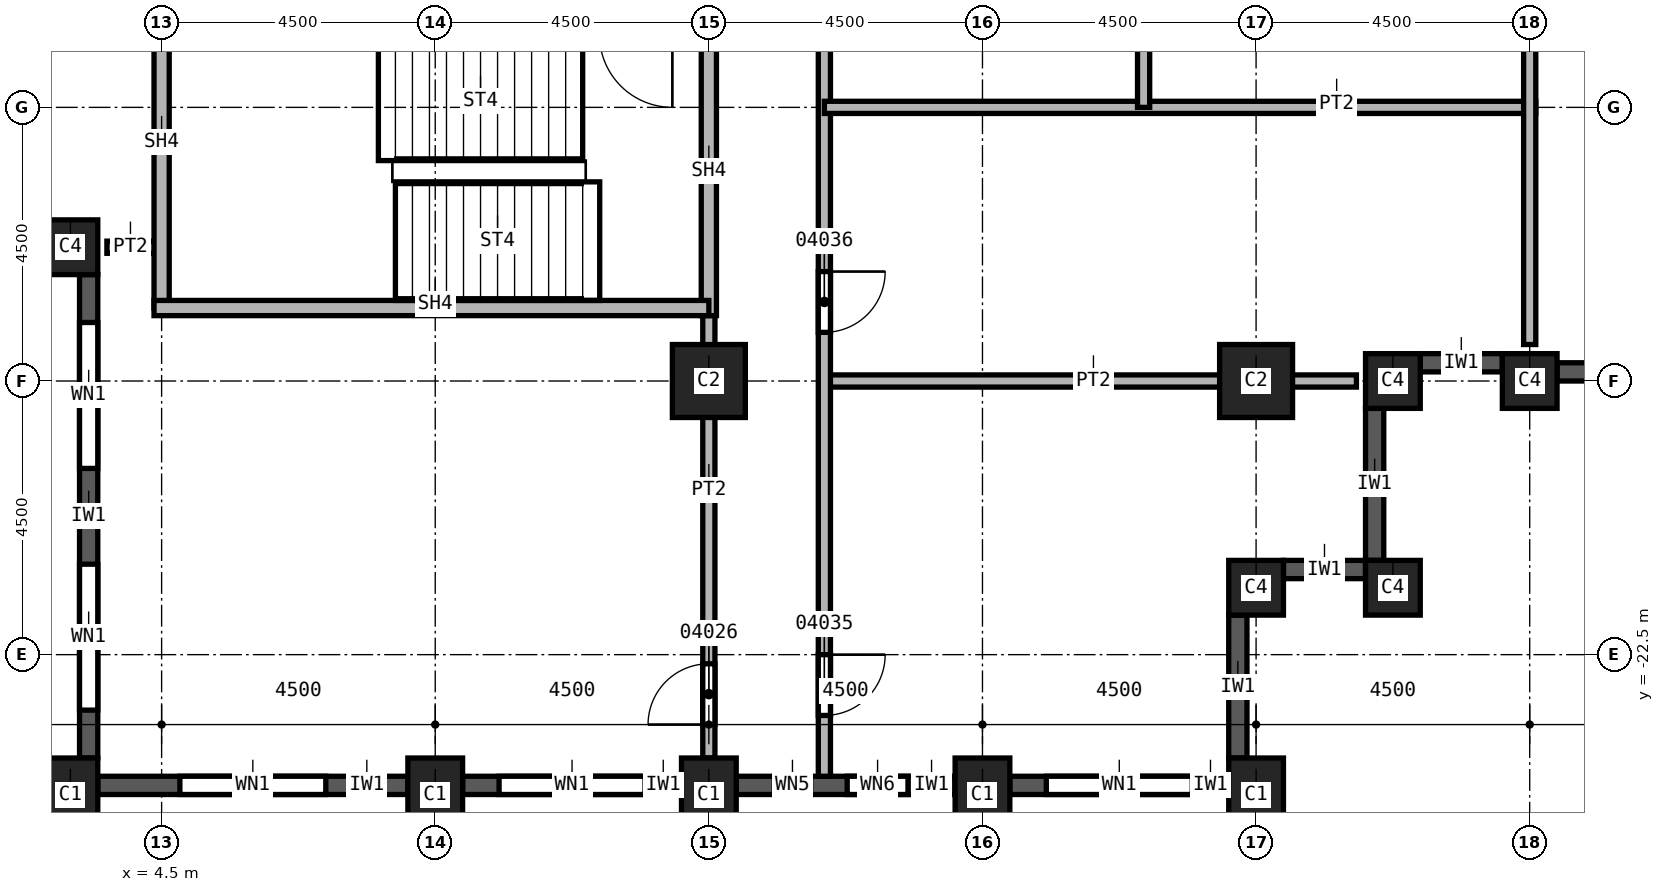
"""IFC4 building model, lengths in metres.
Left out: names, types, materials, properties, quantities, classifications, styles, units other than length and angle.
Written with IfcOpenShell. Run it as: python <this file> out.ifc"""

import sys

from ifc_helpers import new_model, si_unit, direction, frame, frame_2d, origin, origin_2d, place, context, subcontext, project, spatial, rectangle, extrude, element, fill, save


model = new_model("IFC4")
c1 = context("Model", 3, precision=1e-05, world=origin(), true_north=direction((0.0, 1.0)))
c2 = subcontext(c1, "Body", "Model", "MODEL_VIEW")
j1 = project(units=[si_unit("LENGTHUNIT", "METRE"), si_unit("PLANEANGLEUNIT", "RADIAN")], contexts=[c1])
p1 = place(None, origin())
s1 = spatial("IfcSite", under=j1, at=p1, CompositionType="ELEMENT")
p2 = place(p1, origin())
s2 = spatial("IfcBuilding", under=s1, at=p2, CompositionType="ELEMENT")
p3 = place(p2, frame((0.0, 0.0, 104.0)))
s3 = spatial("IfcBuildingStorey", under=s2, at=p3, CompositionType="ELEMENT", Elevation=104.0)
for number, where, z_axis, x_axis in (
    (1, (13.5, -18.0, 0.0), (0.0, 0.0, 1.0), (1.0, 0.0, 0.0)),
    (2, (22.5, -18.0, 0.0), (0.0, 0.0, 1.0), (1.0, 0.0, 0.0)),
):
    element("IfcColumn", number, at=place(p3, frame(where, z_axis=z_axis, x_axis=x_axis)), inside=s3, PredefinedType="COLUMN", context=c2, shape_type="SweptSolid", body=[
        extrude(rectangle(XDim=1.2, YDim=1.2, at=origin_2d()), origin(), (0.0, 0.0, 1.0), 3.7),
    ])
p4 = place(p3, frame((27.0, -18.0, 0.0), z_axis=(0.0, 0.0, 1.0), x_axis=(1.0, 0.0, 0.0)))
e3 = element("IfcColumn", 3, at=p4, inside=s3, PredefinedType="COLUMN", context=c2, shape_type="SweptSolid", body=[
    extrude(rectangle(XDim=0.9, YDim=0.9, at=origin_2d()), origin(), (0.0, 0.0, 1.0), 3.7),
])
for number, where, z_axis, x_axis in (
    (4, (3.0, -24.8, 0.0), (0.0, 0.0, 1.0), (1.0, 0.0, 0.0)),
    (5, (9.0, -24.8, 0.0), (0.0, 0.0, 1.0), (1.0, 0.0, 0.0)),
    (6, (13.5, -24.8, 0.0), (0.0, 0.0, 1.0), (1.0, 0.0, 0.0)),
    (7, (18.0, -24.8, 0.0), (0.0, 0.0, 1.0), (1.0, 0.0, 0.0)),
    (8, (22.5, -24.8, 0.0), (0.0, 0.0, 1.0), (1.0, 0.0, 0.0)),
):
    element("IfcColumn", number, at=place(p3, frame(where, z_axis=z_axis, x_axis=x_axis)), inside=s3, PredefinedType="COLUMN", context=c2, shape_type="SweptSolid", body=[
        extrude(rectangle(XDim=0.9, YDim=1.2, at=origin_2d()), origin(), (0.0, 0.0, 1.0), 3.7),
    ])
for number, where, z_axis, x_axis in (
    (9, (3.0, -15.8, 0.0), (0.0, 0.0, 1.0), (1.0, 0.0, 0.0)),
    (10, (22.5, -21.4, 0.0), (0.0, 0.0, 1.0), (1.0, 0.0, 0.0)),
    (11, (24.75, -21.4, 0.0), (0.0, 0.0, 1.0), (1.0, 0.0, 0.0)),
    (12, (24.75, -18.0, 0.0), (0.0, 0.0, 1.0), (1.0, 0.0, 0.0)),
):
    element("IfcColumn", number, at=place(p3, frame(where, z_axis=z_axis, x_axis=x_axis)), inside=s3, PredefinedType="COLUMN", context=c2, shape_type="SweptSolid", body=[
        extrude(rectangle(XDim=0.9, YDim=0.9, at=origin_2d()), origin(), (0.0, 0.0, 1.0), 3.7),
    ])
p5 = place(p3, frame((3.3, -16.25, 0.0), z_axis=(0.0, 0.0, 1.0), x_axis=(0.0, -1.0, 0.0)))
e13 = element("IfcWall", 13, at=p5, inside=s3, PredefinedType="SOLIDWALL", context=c2, shape_type="SweptSolid", body=[
    extrude(rectangle(XDim=7.95, YDim=0.3, at=frame_2d((3.975, 0.0))), origin(), (0.0, 0.0, 1.0), 3.1),
])
p6 = place(p5, frame((0.788, 0.0, 0.8)))
e14 = element("IfcOpeningElement", 14, at=p6, cuts=e13, PredefinedType="OPENING", context=c2, shape_type="SweptSolid", body=[
    extrude(rectangle(XDim=2.4, YDim=1.95, at=frame_2d((1.2, 0.975))), frame((0.0, 0.15, 0.0), z_axis=(0.0, -1.0, 0.0), x_axis=(1.0, 0.0, 0.0)), (0.0, 0.0, 1.0), 0.3),
])
p7 = place(p5, frame((4.762, 0.0, 0.8)))
e15 = element("IfcOpeningElement", 15, at=p7, cuts=e13, PredefinedType="OPENING", context=c2, shape_type="SweptSolid", body=[
    extrude(rectangle(XDim=2.4, YDim=1.95, at=frame_2d((1.2, 0.975))), frame((0.0, 0.15, 0.0), z_axis=(0.0, -1.0, 0.0), x_axis=(1.0, 0.0, 0.0)), (0.0, 0.0, 1.0), 0.3),
])
p8 = place(p3, frame((3.45, -24.65, 0.0), z_axis=(0.0, 0.0, 1.0), x_axis=(1.0, 0.0, 0.0)))
e16 = element("IfcWall", 16, at=p8, inside=s3, PredefinedType="SOLIDWALL", context=c2, shape_type="SweptSolid", body=[
    extrude(rectangle(XDim=5.1, YDim=0.3, at=frame_2d((2.55, 0.0))), origin(), (0.0, 0.0, 1.0), 3.1),
])
p9 = place(p8, frame((1.35, 0.0, 0.8)))
e17 = element("IfcOpeningElement", 17, at=p9, cuts=e16, PredefinedType="OPENING", context=c2, shape_type="SweptSolid", body=[
    extrude(rectangle(XDim=2.4, YDim=1.95, at=frame_2d((1.2, 0.975))), frame((0.0, 0.15, 0.0), z_axis=(0.0, -1.0, 0.0), x_axis=(1.0, 0.0, 0.0)), (0.0, 0.0, 1.0), 0.3),
])
p10 = place(p3, frame((9.45, -24.65, 0.0), z_axis=(0.0, 0.0, 1.0), x_axis=(1.0, 0.0, 0.0)))
e18 = element("IfcWall", 18, at=p10, inside=s3, PredefinedType="SOLIDWALL", context=c2, shape_type="SweptSolid", body=[
    extrude(rectangle(XDim=3.6, YDim=0.3, at=frame_2d((1.8, 0.0))), origin(), (0.0, 0.0, 1.0), 3.1),
])
p11 = place(p10, frame((0.6, 0.0, 0.8)))
e19 = element("IfcOpeningElement", 19, at=p11, cuts=e18, PredefinedType="OPENING", context=c2, shape_type="SweptSolid", body=[
    extrude(rectangle(XDim=2.4, YDim=1.95, at=frame_2d((1.2, 0.975))), frame((0.0, 0.15, 0.0), z_axis=(0.0, -1.0, 0.0), x_axis=(1.0, 0.0, 0.0)), (0.0, 0.0, 1.0), 0.3),
])
p12 = place(p3, frame((13.95, -24.65, 0.0), z_axis=(0.0, 0.0, 1.0), x_axis=(1.0, 0.0, 0.0)))
e20 = element("IfcWall", 20, at=p12, inside=s3, PredefinedType="SOLIDWALL", context=c2, shape_type="SweptSolid", body=[
    extrude(rectangle(XDim=3.6, YDim=0.3, at=frame_2d((1.8, 0.0))), origin(), (0.0, 0.0, 1.0), 3.1),
])
p13 = place(p12, frame((0.625, 0.0, 0.8)))
e21 = element("IfcOpeningElement", 21, at=p13, cuts=e20, PredefinedType="OPENING", context=c2, shape_type="SweptSolid", body=[
    extrude(rectangle(XDim=0.6, YDim=1.95, at=frame_2d((0.3, 0.975))), frame((0.0, 0.15, 0.0), z_axis=(0.0, -1.0, 0.0), x_axis=(1.0, 0.0, 0.0)), (0.0, 0.0, 1.0), 0.3),
])
p14 = place(p12, frame((1.825, 0.0, 0.8)))
e22 = element("IfcOpeningElement", 22, at=p14, cuts=e20, PredefinedType="OPENING", context=c2, shape_type="SweptSolid", body=[
    extrude(rectangle(XDim=1.0, YDim=1.95, at=frame_2d((0.5, 0.975))), frame((0.0, 0.15, 0.0), z_axis=(0.0, -1.0, 0.0), x_axis=(1.0, 0.0, 0.0)), (0.0, 0.0, 1.0), 0.3),
])
p15 = place(p3, frame((18.45, -24.65, 0.0), z_axis=(0.0, 0.0, 1.0), x_axis=(1.0, 0.0, 0.0)))
e23 = element("IfcWall", 23, at=p15, inside=s3, PredefinedType="SOLIDWALL", context=c2, shape_type="SweptSolid", body=[
    extrude(rectangle(XDim=3.6, YDim=0.3, at=frame_2d((1.8, 0.0))), origin(), (0.0, 0.0, 1.0), 3.1),
])
p16 = place(p15, frame((0.6, 0.0, 0.8)))
e24 = element("IfcOpeningElement", 24, at=p16, cuts=e23, PredefinedType="OPENING", context=c2, shape_type="SweptSolid", body=[
    extrude(rectangle(XDim=2.4, YDim=1.95, at=frame_2d((1.2, 0.975))), frame((0.0, 0.15, 0.0), z_axis=(0.0, -1.0, 0.0), x_axis=(1.0, 0.0, 0.0)), (0.0, 0.0, 1.0), 0.3),
])
p17 = place(p3, frame((22.2, -24.2, 0.0), z_axis=(0.0, 0.0, 1.0), x_axis=(0.0, 1.0, 0.0)))
e25 = element("IfcWall", 25, at=p17, inside=s3, PredefinedType="SOLIDWALL", context=c2, shape_type="SweptSolid", body=[
    extrude(rectangle(XDim=2.35, YDim=0.3, at=frame_2d((1.175, 0.0))), origin(), (0.0, 0.0, 1.0), 3.1),
])
p18 = place(p3, frame((22.95, -21.1, 0.0), z_axis=(0.0, 0.0, 1.0), x_axis=(1.0, 0.0, 0.0)))
e26 = element("IfcWall", 26, at=p18, inside=s3, PredefinedType="SOLIDWALL", context=c2, shape_type="SweptSolid", body=[
    extrude(rectangle(XDim=1.35, YDim=0.3, at=frame_2d((0.675, 0.0))), origin(), (0.0, 0.0, 1.0), 3.1),
])
p19 = place(p3, frame((24.45, -20.95, 0.0), z_axis=(0.0, 0.0, 1.0), x_axis=(0.0, 1.0, 0.0)))
e27 = element("IfcWall", 27, at=p19, inside=s3, PredefinedType="SOLIDWALL", context=c2, shape_type="SweptSolid", body=[
    extrude(rectangle(XDim=2.5, YDim=0.3, at=frame_2d((1.25, 0.0))), origin(), (0.0, 0.0, 1.0), 3.1),
])
p20 = place(p3, frame((25.2, -17.7, 0.0), z_axis=(0.0, 0.0, 1.0), x_axis=(1.0, 0.0, 0.0)))
e28 = element("IfcWall", 28, at=p20, inside=s3, PredefinedType="SOLIDWALL", context=c2, shape_type="SweptSolid", body=[
    extrude(rectangle(XDim=1.35, YDim=0.3, at=frame_2d((0.675, 0.0))), origin(), (0.0, 0.0, 1.0), 3.1),
])
p21 = place(p3, frame((27.45, -17.85, 0.0), z_axis=(0.0, 0.0, 1.0), x_axis=(1.0, 0.0, 0.0)))
e29 = element("IfcWall", 29, at=p21, inside=s3, PredefinedType="SOLIDWALL", context=c2, shape_type="SweptSolid", body=[
    extrude(rectangle(XDim=3.6, YDim=0.3, at=frame_2d((1.8, 0.0))), origin(), (0.0, 0.0, 1.0), 3.1),
])
p22 = place(p21, frame((0.6, 0.0, 0.8)))
e30 = element("IfcOpeningElement", 30, at=p22, cuts=e29, PredefinedType="OPENING", context=c2, shape_type="SweptSolid", body=[
    extrude(rectangle(XDim=2.4, YDim=1.95, at=frame_2d((1.2, 0.975))), frame((0.0, 0.15, 0.0), z_axis=(0.0, -1.0, 0.0), x_axis=(1.0, 0.0, 0.0)), (0.0, 0.0, 1.0), 0.3),
])
p23 = place(p3, frame((4.5, -15.8, 0.0), z_axis=(0.0, 0.0, 1.0), x_axis=(-1.0, 0.0, 0.0)))
e31 = element("IfcWall", 31, at=p23, inside=s3, PredefinedType="PARTITIONING", context=c2, shape_type="SweptSolid", body=[
    extrude(rectangle(XDim=0.9, YDim=0.2, at=frame_2d((0.45, 0.0))), origin(), (0.0, 0.0, 1.0), 3.7),
])
p24 = place(p3, frame((13.5, -24.2, 0.0), z_axis=(0.0, 0.0, 1.0), x_axis=(0.0, 1.0, 0.0)))
e32 = element("IfcWall", 32, at=p24, inside=s3, PredefinedType="PARTITIONING", context=c2, shape_type="SweptSolid", body=[
    extrude(rectangle(XDim=7.525, YDim=0.2, at=frame_2d((3.762, 0.0))), origin(), (0.0, 0.0, 1.0), 3.7),
])
p25 = place(p24, frame((0.55, 0.0, 0.0)))
e33 = element("IfcOpeningElement", 33, at=p25, cuts=e32, PredefinedType="OPENING", context=c2, shape_type="SweptSolid", body=[
    extrude(rectangle(XDim=1.0, YDim=2.1, at=frame_2d((0.5, 1.05))), frame((0.0, 0.1, 0.0), z_axis=(0.0, -1.0, 0.0), x_axis=(1.0, 0.0, 0.0)), (0.0, 0.0, 1.0), 0.2),
])
p26 = place(p3, frame((15.4, -18.0, 0.0), z_axis=(0.0, 0.0, 1.0), x_axis=(1.0, 0.0, 0.0)))
e34 = element("IfcWall", 34, at=p26, inside=s3, PredefinedType="PARTITIONING", context=c2, shape_type="SweptSolid", body=[
    extrude(rectangle(XDim=8.75, YDim=0.2, at=frame_2d((4.375, 0.0))), origin(), (0.0, 0.0, 1.0), 3.7),
])
p27 = place(p3, frame((15.4, -3.65, 0.0), z_axis=(0.0, 0.0, 1.0), x_axis=(0.0, -1.0, 0.0)))
e35 = element("IfcWall", 35, at=p27, inside=s3, PredefinedType="PARTITIONING", context=c2, shape_type="SweptSolid", body=[
    extrude(rectangle(XDim=20.85, YDim=0.2, at=frame_2d((10.425, 0.0))), origin(), (0.0, 0.0, 1.0), 3.7),
])
p28 = place(p27, frame((18.85, 0.0, 0.0)))
e36 = element("IfcOpeningElement", 36, at=p28, cuts=e35, PredefinedType="OPENING", context=c2, shape_type="SweptSolid", body=[
    extrude(rectangle(XDim=1.0, YDim=2.1, at=frame_2d((0.5, 1.05))), frame((0.0, 0.1, 0.0), z_axis=(0.0, -1.0, 0.0), x_axis=(1.0, 0.0, 0.0)), (0.0, 0.0, 1.0), 0.2),
])
p29 = place(p27, frame((12.55, 0.0, 0.0)))
e37 = element("IfcOpeningElement", 37, at=p29, cuts=e35, PredefinedType="OPENING", context=c2, shape_type="SweptSolid", body=[
    extrude(rectangle(XDim=1.0, YDim=2.1, at=frame_2d((0.5, 1.05))), frame((0.0, 0.1, 0.0), z_axis=(0.0, -1.0, 0.0), x_axis=(1.0, 0.0, 0.0)), (0.0, 0.0, 1.0), 0.2),
])
p30 = place(p27, frame((4.45, 0.0, 0.0)))
e38 = element("IfcOpeningElement", 38, at=p30, cuts=e35, PredefinedType="OPENING", context=c2, shape_type="SweptSolid", body=[
    extrude(rectangle(XDim=1.0, YDim=2.1, at=frame_2d((0.5, 1.05))), frame((0.0, 0.1, 0.0), z_axis=(0.0, -1.0, 0.0), x_axis=(1.0, 0.0, 0.0)), (0.0, 0.0, 1.0), 0.2),
])
p31 = place(p3, frame((15.4, -13.5, 0.0), z_axis=(0.0, 0.0, 1.0), x_axis=(1.0, 0.0, 0.0)))
e39 = element("IfcWall", 39, at=p31, inside=s3, PredefinedType="PARTITIONING", context=c2, shape_type="SweptSolid", body=[
    extrude(rectangle(XDim=11.7, YDim=0.2, at=frame_2d((5.85, 0.0))), origin(), (0.0, 0.0, 1.0), 3.7),
])
p32 = place(p3, frame((20.65, -3.75, 0.0), z_axis=(0.0, 0.0, 1.0), x_axis=(0.0, -1.0, 0.0)))
e40 = element("IfcWall", 40, at=p32, inside=s3, PredefinedType="PARTITIONING", context=c2, shape_type="SweptSolid", body=[
    extrude(rectangle(XDim=9.75, YDim=0.2, at=frame_2d((4.875, 0.0))), origin(), (0.0, 0.0, 1.0), 3.7),
])
p33 = place(p32, frame((3.4, 0.0, 0.0)))
e41 = element("IfcOpeningElement", 41, at=p33, cuts=e40, PredefinedType="OPENING", context=c2, shape_type="SweptSolid", body=[
    extrude(rectangle(XDim=1.0, YDim=2.1, at=frame_2d((0.5, 1.05))), frame((0.0, 0.1, 0.0), z_axis=(0.0, -1.0, 0.0), x_axis=(1.0, 0.0, 0.0)), (0.0, 0.0, 1.0), 0.2),
])
p34 = place(p3, frame((27.0, -3.75, 0.0), z_axis=(0.0, 0.0, 1.0), x_axis=(0.0, -1.0, 0.0)))
e42 = element("IfcWall", 42, at=p34, inside=s3, PredefinedType="PARTITIONING", context=c2, shape_type="SweptSolid", body=[
    extrude(rectangle(XDim=13.65, YDim=0.2, at=frame_2d((6.825, 0.0))), origin(), (0.0, 0.0, 1.0), 3.7),
])
p35 = place(p3, frame((4.5, -16.8, 0.0), z_axis=(0.0, 0.0, 1.0), x_axis=(0.0, 1.0, 0.0)))
e43 = element("IfcWall", 43, at=p35, inside=s3, PredefinedType="SOLIDWALL", context=c2, shape_type="SweptSolid", body=[
    extrude(rectangle(XDim=4.5, YDim=0.25, at=frame_2d((2.25, 0.0))), origin(), (0.0, 0.0, 1.0), 3.7),
])
p36 = place(p3, frame((13.5, -16.925, 0.0), z_axis=(0.0, 0.0, 1.0), x_axis=(0.0, 1.0, 0.0)))
e44 = element("IfcWall", 44, at=p36, inside=s3, PredefinedType="SOLIDWALL", context=c2, shape_type="SweptSolid", body=[
    extrude(rectangle(XDim=4.75, YDim=0.25, at=frame_2d((2.375, 0.0))), origin(), (0.0, 0.0, 1.0), 3.7),
])
p37 = place(p3, frame((13.5, -16.8, 0.0), z_axis=(0.0, 0.0, 1.0), x_axis=(-1.0, 0.0, 0.0)))
e45 = element("IfcWall", 45, at=p37, inside=s3, PredefinedType="SOLIDWALL", context=c2, shape_type="SweptSolid", body=[
    extrude(rectangle(XDim=9.125, YDim=0.25, at=frame_2d((4.562, 0.0))), origin(), (0.0, 0.0, 1.0), 3.7),
])
p38 = place(p6, origin())
e46 = element("IfcWindow", 46, at=p38, inside=s3, PartitioningType="SINGLE_PANEL", PredefinedType="WINDOW", context=c2, shape_type="SweptSolid", body=[
    extrude(rectangle(XDim=2.4, YDim=1.95, at=frame_2d((1.2, 0.975))), frame((0.0, 0.03, 0.0), z_axis=(0.0, -1.0, 0.0), x_axis=(1.0, 0.0, 0.0)), (0.0, 0.0, 1.0), 0.06),
])
fill(e14, e46)
p39 = place(p7, origin())
e47 = element("IfcWindow", 47, at=p39, inside=s3, PartitioningType="SINGLE_PANEL", PredefinedType="WINDOW", context=c2, shape_type="SweptSolid", body=[
    extrude(rectangle(XDim=2.4, YDim=1.95, at=frame_2d((1.2, 0.975))), frame((0.0, 0.03, 0.0), z_axis=(0.0, -1.0, 0.0), x_axis=(1.0, 0.0, 0.0)), (0.0, 0.0, 1.0), 0.06),
])
fill(e15, e47)
p40 = place(p9, origin())
e48 = element("IfcWindow", 48, at=p40, inside=s3, PartitioningType="SINGLE_PANEL", PredefinedType="WINDOW", context=c2, shape_type="SweptSolid", body=[
    extrude(rectangle(XDim=2.4, YDim=1.95, at=frame_2d((1.2, 0.975))), frame((0.0, 0.03, 0.0), z_axis=(0.0, -1.0, 0.0), x_axis=(1.0, 0.0, 0.0)), (0.0, 0.0, 1.0), 0.06),
])
fill(e17, e48)
p41 = place(p11, origin())
e49 = element("IfcWindow", 49, at=p41, inside=s3, PartitioningType="SINGLE_PANEL", PredefinedType="WINDOW", context=c2, shape_type="SweptSolid", body=[
    extrude(rectangle(XDim=2.4, YDim=1.95, at=frame_2d((1.2, 0.975))), frame((0.0, 0.03, 0.0), z_axis=(0.0, -1.0, 0.0), x_axis=(1.0, 0.0, 0.0)), (0.0, 0.0, 1.0), 0.06),
])
fill(e19, e49)
p42 = place(p16, origin())
e50 = element("IfcWindow", 50, at=p42, inside=s3, PartitioningType="SINGLE_PANEL", PredefinedType="WINDOW", context=c2, shape_type="SweptSolid", body=[
    extrude(rectangle(XDim=2.4, YDim=1.95, at=frame_2d((1.2, 0.975))), frame((0.0, 0.03, 0.0), z_axis=(0.0, -1.0, 0.0), x_axis=(1.0, 0.0, 0.0)), (0.0, 0.0, 1.0), 0.06),
])
fill(e24, e50)
p43 = place(p25, origin())
e51 = element("IfcDoor", 51, at=p43, inside=s3, OperationType="SINGLE_SWING_LEFT", PredefinedType="DOOR", context=c2, shape_type="SweptSolid", body=[
    extrude(rectangle(XDim=1.0, YDim=2.1, at=frame_2d((0.5, 1.05))), frame((0.0, 0.025, 0.0), z_axis=(0.0, -1.0, 0.0), x_axis=(1.0, 0.0, 0.0)), (0.0, 0.0, 1.0), 0.05),
])
fill(e33, e51)
p44 = place(p28, origin())
e52 = element("IfcDoor", 52, at=p44, inside=s3, OperationType="SINGLE_SWING_RIGHT", PredefinedType="DOOR", context=c2, shape_type="SweptSolid", body=[
    extrude(rectangle(XDim=1.0, YDim=2.1, at=frame_2d((0.5, 1.05))), frame((0.0, 0.025, 0.0), z_axis=(0.0, -1.0, 0.0), x_axis=(1.0, 0.0, 0.0)), (0.0, 0.0, 1.0), 0.05),
])
fill(e36, e52)
p45 = place(p29, origin())
e53 = element("IfcDoor", 53, at=p45, inside=s3, OperationType="SINGLE_SWING_LEFT", PredefinedType="DOOR", context=c2, shape_type="SweptSolid", body=[
    extrude(rectangle(XDim=1.0, YDim=2.1, at=frame_2d((0.5, 1.05))), frame((0.0, 0.025, 0.0), z_axis=(0.0, -1.0, 0.0), x_axis=(1.0, 0.0, 0.0)), (0.0, 0.0, 1.0), 0.05),
])
fill(e37, e53)
p46 = place(p13, origin())
e54 = element("IfcWindow", 54, at=p46, inside=s3, PartitioningType="SINGLE_PANEL", PredefinedType="WINDOW", context=c2, shape_type="SweptSolid", body=[
    extrude(rectangle(XDim=0.6, YDim=1.95, at=frame_2d((0.3, 0.975))), frame((0.0, 0.03, 0.0), z_axis=(0.0, -1.0, 0.0), x_axis=(1.0, 0.0, 0.0)), (0.0, 0.0, 1.0), 0.06),
])
fill(e21, e54)
p47 = place(p14, origin())
e55 = element("IfcWindow", 55, at=p47, inside=s3, PartitioningType="SINGLE_PANEL", PredefinedType="WINDOW", context=c2, shape_type="SweptSolid", body=[
    extrude(rectangle(XDim=1.0, YDim=1.95, at=frame_2d((0.5, 0.975))), frame((0.0, 0.03, 0.0), z_axis=(0.0, -1.0, 0.0), x_axis=(1.0, 0.0, 0.0)), (0.0, 0.0, 1.0), 0.06),
])
fill(e22, e55)
save(model, sys.argv[1])
